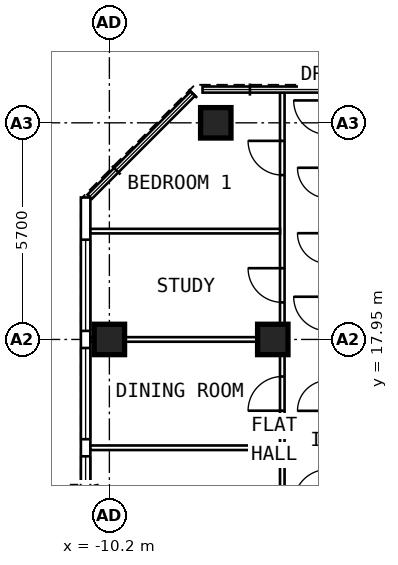
"""IFC4 building model, lengths in metres.
Left out: names, types, materials, properties, quantities, classifications, styles, units other than length and angle.
Written with IfcOpenShell. Run it as: python <this file> out.ifc"""

import sys

from ifc_helpers import new_model, si_unit, direction, frame, frame_2d, origin, origin_2d, place, context, subcontext, project, spatial, rectangle, extrude, element, fill, save


model = new_model("IFC4")
c1 = context("Model", 3, precision=1e-05, world=origin(), true_north=direction((0.0, 1.0)))
c2 = subcontext(c1, "Body", "Model", "MODEL_VIEW")
j1 = project(units=[si_unit("LENGTHUNIT", "METRE"), si_unit("PLANEANGLEUNIT", "RADIAN")], contexts=[c1])
p1 = place(None, origin())
s1 = spatial("IfcSite", under=j1, at=p1, CompositionType="ELEMENT")
p2 = place(p1, origin())
s2 = spatial("IfcBuilding", under=s1, at=p2, CompositionType="ELEMENT")
p3 = place(p2, frame((0.0, 0.0, 281.8)))
s3 = spatial("IfcBuildingStorey", under=s2, at=p3, CompositionType="ELEMENT", Elevation=281.8)
for number, where, z_axis, x_axis in (
    (1, (-10.2, 17.95, 0.0), (0.0, 0.0, 1.0), (0.0, 1.0, 0.0)),
    (2, (-7.4, 23.65, 0.0), (0.0, 0.0, 1.0), (0.0, 1.0, 0.0)),
    (3, (-5.9, 17.95, 0.0), (0.0, 0.0, 1.0), (0.0, 1.0, 0.0)),
):
    element("IfcColumn", number, at=place(p3, frame(where, z_axis=z_axis, x_axis=x_axis)), inside=s3, PredefinedType="COLUMN", context=c2, shape_type="SweptSolid", body=[
        extrude(rectangle(XDim=0.8, YDim=0.8, at=origin_2d()), origin(), (0.0, 0.0, 1.0), 3.6),
    ])
p4 = place(p3, frame((-10.825, 6.148, 0.0), z_axis=(0.0, 0.0, 1.0), x_axis=(0.0, 1.0, 0.0)))
e4 = element("IfcWall", 4, at=p4, inside=s3, PredefinedType="SOLIDWALL", context=c2, shape_type="SweptSolid", body=[
    extrude(rectangle(XDim=15.537, YDim=0.25, at=frame_2d((7.769, 0.0))), origin(), (0.0, 0.0, 1.0), 3.35),
])
p5 = place(p4, frame((0.627, 0.0, 0.6)))
e5 = element("IfcOpeningElement", 5, at=p5, cuts=e4, PredefinedType="OPENING", context=c2, shape_type="SweptSolid", body=[
    extrude(rectangle(XDim=2.4, YDim=2.0, at=frame_2d((1.2, 1.0))), frame((0.0, 0.137, 0.0), z_axis=(0.0, -1.0, 0.0), x_axis=(1.0, 0.0, 0.0)), (0.0, 0.0, 1.0), 0.274),
])
p6 = place(p4, frame((3.477, 0.0, 0.6)))
e6 = element("IfcOpeningElement", 6, at=p6, cuts=e4, PredefinedType="OPENING", context=c2, shape_type="SweptSolid", body=[
    extrude(rectangle(XDim=2.4, YDim=2.0, at=frame_2d((1.2, 1.0))), frame((0.0, 0.137, 0.0), z_axis=(0.0, -1.0, 0.0), x_axis=(1.0, 0.0, 0.0)), (0.0, 0.0, 1.0), 0.274),
])
p7 = place(p4, frame((6.327, 0.0, 0.6)))
e7 = element("IfcOpeningElement", 7, at=p7, cuts=e4, PredefinedType="OPENING", context=c2, shape_type="SweptSolid", body=[
    extrude(rectangle(XDim=2.4, YDim=2.0, at=frame_2d((1.2, 1.0))), frame((0.0, 0.137, 0.0), z_axis=(0.0, -1.0, 0.0), x_axis=(1.0, 0.0, 0.0)), (0.0, 0.0, 1.0), 0.274),
])
p8 = place(p4, frame((9.177, 0.0, 0.6)))
e8 = element("IfcOpeningElement", 8, at=p8, cuts=e4, PredefinedType="OPENING", context=c2, shape_type="SweptSolid", body=[
    extrude(rectangle(XDim=2.4, YDim=2.0, at=frame_2d((1.2, 1.0))), frame((0.0, 0.137, 0.0), z_axis=(0.0, -1.0, 0.0), x_axis=(1.0, 0.0, 0.0)), (0.0, 0.0, 1.0), 0.274),
])
p9 = place(p4, frame((12.027, 0.0, 0.6)))
e9 = element("IfcOpeningElement", 9, at=p9, cuts=e4, PredefinedType="OPENING", context=c2, shape_type="SweptSolid", body=[
    extrude(rectangle(XDim=2.4, YDim=2.0, at=frame_2d((1.2, 1.0))), frame((0.0, 0.137, 0.0), z_axis=(0.0, -1.0, 0.0), x_axis=(1.0, 0.0, 0.0)), (0.0, 0.0, 1.0), 0.274),
])
p10 = place(p3, frame((-5.65, 9.6, 0.0), z_axis=(0.0, 0.0, 1.0), x_axis=(0.0, 1.0, 0.0)))
e10 = element("IfcWall", 10, at=p10, inside=s3, PredefinedType="PARTITIONING", context=c2, shape_type="SweptSolid", body=[
    extrude(rectangle(XDim=14.845, YDim=0.12, at=frame_2d((7.422, 0.0))), origin(), (0.0, 0.0, 1.0), 3.35),
])
p11 = place(p10, frame((3.2, 0.0, 0.0)))
e11 = element("IfcOpeningElement", 11, at=p11, cuts=e10, PredefinedType="OPENING", context=c2, shape_type="SweptSolid", body=[
    extrude(rectangle(XDim=0.9, YDim=2.1, at=frame_2d((0.45, 1.05))), frame((0.0, 0.072, 0.0), z_axis=(0.0, -1.0, 0.0), x_axis=(1.0, 0.0, 0.0)), (0.0, 0.0, 1.0), 0.144),
])
p12 = place(p10, frame((6.475, 0.0, 0.0)))
e12 = element("IfcOpeningElement", 12, at=p12, cuts=e10, PredefinedType="OPENING", context=c2, shape_type="SweptSolid", body=[
    extrude(rectangle(XDim=0.9, YDim=2.1, at=frame_2d((0.45, 1.05))), frame((0.0, 0.072, 0.0), z_axis=(0.0, -1.0, 0.0), x_axis=(1.0, 0.0, 0.0)), (0.0, 0.0, 1.0), 0.144),
])
p13 = place(p10, frame((9.325, 0.0, 0.0)))
e13 = element("IfcOpeningElement", 13, at=p13, cuts=e10, PredefinedType="OPENING", context=c2, shape_type="SweptSolid", body=[
    extrude(rectangle(XDim=0.9, YDim=2.1, at=frame_2d((0.45, 1.05))), frame((0.0, 0.072, 0.0), z_axis=(0.0, -1.0, 0.0), x_axis=(1.0, 0.0, 0.0)), (0.0, 0.0, 1.0), 0.144),
])
p14 = place(p10, frame((12.675, 0.0, 0.0)))
e14 = element("IfcOpeningElement", 14, at=p14, cuts=e10, PredefinedType="OPENING", context=c2, shape_type="SweptSolid", body=[
    extrude(rectangle(XDim=0.9, YDim=2.1, at=frame_2d((0.45, 1.05))), frame((0.0, 0.072, 0.0), z_axis=(0.0, -1.0, 0.0), x_axis=(1.0, 0.0, 0.0)), (0.0, 0.0, 1.0), 0.144),
])
p15 = place(p3, frame((-5.71, 15.1, 0.0), z_axis=(0.0, 0.0, 1.0), x_axis=(-1.0, 0.0, 0.0)))
e15 = element("IfcWall", 15, at=p15, inside=s3, PredefinedType="PARTITIONING", context=c2, shape_type="SweptSolid", body=[
    extrude(rectangle(XDim=4.99, YDim=0.12, at=frame_2d((2.495, 0.0))), origin(), (0.0, 0.0, 1.0), 3.35),
])
p16 = place(p3, frame((-5.71, 17.95, 0.0), z_axis=(0.0, 0.0, 1.0), x_axis=(-1.0, 0.0, 0.0)))
e16 = element("IfcWall", 16, at=p16, inside=s3, PredefinedType="PARTITIONING", context=c2, shape_type="SweptSolid", body=[
    extrude(rectangle(XDim=4.99, YDim=0.12, at=frame_2d((2.495, 0.0))), origin(), (0.0, 0.0, 1.0), 2.45),
])
p17 = place(p3, frame((-5.71, 20.8, 0.0), z_axis=(0.0, 0.0, 1.0), x_axis=(-1.0, 0.0, 0.0)))
e17 = element("IfcWall", 17, at=p17, inside=s3, PredefinedType="PARTITIONING", context=c2, shape_type="SweptSolid", body=[
    extrude(rectangle(XDim=4.99, YDim=0.12, at=frame_2d((2.495, 0.0))), origin(), (0.0, 0.0, 1.0), 3.35),
])
p18 = place(p7, origin())
e18 = element("IfcWindow", 18, at=p18, inside=s3, PartitioningType="SINGLE_PANEL", PredefinedType="WINDOW", context=c2, shape_type="SweptSolid", body=[
    extrude(rectangle(XDim=2.4, YDim=2.0, at=frame_2d((1.2, 1.0))), frame((0.0, 0.03, 0.0), z_axis=(0.0, -1.0, 0.0), x_axis=(1.0, 0.0, 0.0)), (0.0, 0.0, 1.0), 0.06),
])
fill(e7, e18)
p19 = place(p8, origin())
e19 = element("IfcWindow", 19, at=p19, inside=s3, PartitioningType="SINGLE_PANEL", PredefinedType="WINDOW", context=c2, shape_type="SweptSolid", body=[
    extrude(rectangle(XDim=2.4, YDim=2.0, at=frame_2d((1.2, 1.0))), frame((0.0, 0.03, 0.0), z_axis=(0.0, -1.0, 0.0), x_axis=(1.0, 0.0, 0.0)), (0.0, 0.0, 1.0), 0.06),
])
fill(e8, e19)
p20 = place(p9, origin())
e20 = element("IfcWindow", 20, at=p20, inside=s3, PartitioningType="SINGLE_PANEL", PredefinedType="WINDOW", context=c2, shape_type="SweptSolid", body=[
    extrude(rectangle(XDim=2.4, YDim=2.0, at=frame_2d((1.2, 1.0))), frame((0.0, 0.03, 0.0), z_axis=(0.0, -1.0, 0.0), x_axis=(1.0, 0.0, 0.0)), (0.0, 0.0, 1.0), 0.06),
])
fill(e9, e20)
p21 = place(p12, origin())
e21 = element("IfcDoor", 21, at=p21, inside=s3, OperationType="SINGLE_SWING_LEFT", PredefinedType="DOOR", context=c2, shape_type="SweptSolid", body=[
    extrude(rectangle(XDim=0.9, YDim=2.1, at=frame_2d((0.45, 1.05))), frame((0.0, 0.025, 0.0), z_axis=(0.0, -1.0, 0.0), x_axis=(1.0, 0.0, 0.0)), (0.0, 0.0, 1.0), 0.05),
])
fill(e12, e21)
p22 = place(p13, origin())
e22 = element("IfcDoor", 22, at=p22, inside=s3, OperationType="SINGLE_SWING_RIGHT", PredefinedType="DOOR", context=c2, shape_type="SweptSolid", body=[
    extrude(rectangle(XDim=0.9, YDim=2.1, at=frame_2d((0.45, 1.05))), frame((0.0, 0.025, 0.0), z_axis=(0.0, -1.0, 0.0), x_axis=(1.0, 0.0, 0.0)), (0.0, 0.0, 1.0), 0.05),
])
fill(e13, e22)
p23 = place(p14, origin())
e23 = element("IfcDoor", 23, at=p23, inside=s3, OperationType="SINGLE_SWING_RIGHT", PredefinedType="DOOR", context=c2, shape_type="SweptSolid", body=[
    extrude(rectangle(XDim=0.9, YDim=2.1, at=frame_2d((0.45, 1.05))), frame((0.0, 0.025, 0.0), z_axis=(0.0, -1.0, 0.0), x_axis=(1.0, 0.0, 0.0)), (0.0, 0.0, 1.0), 0.05),
])
fill(e14, e23)
save(model, sys.argv[1])
